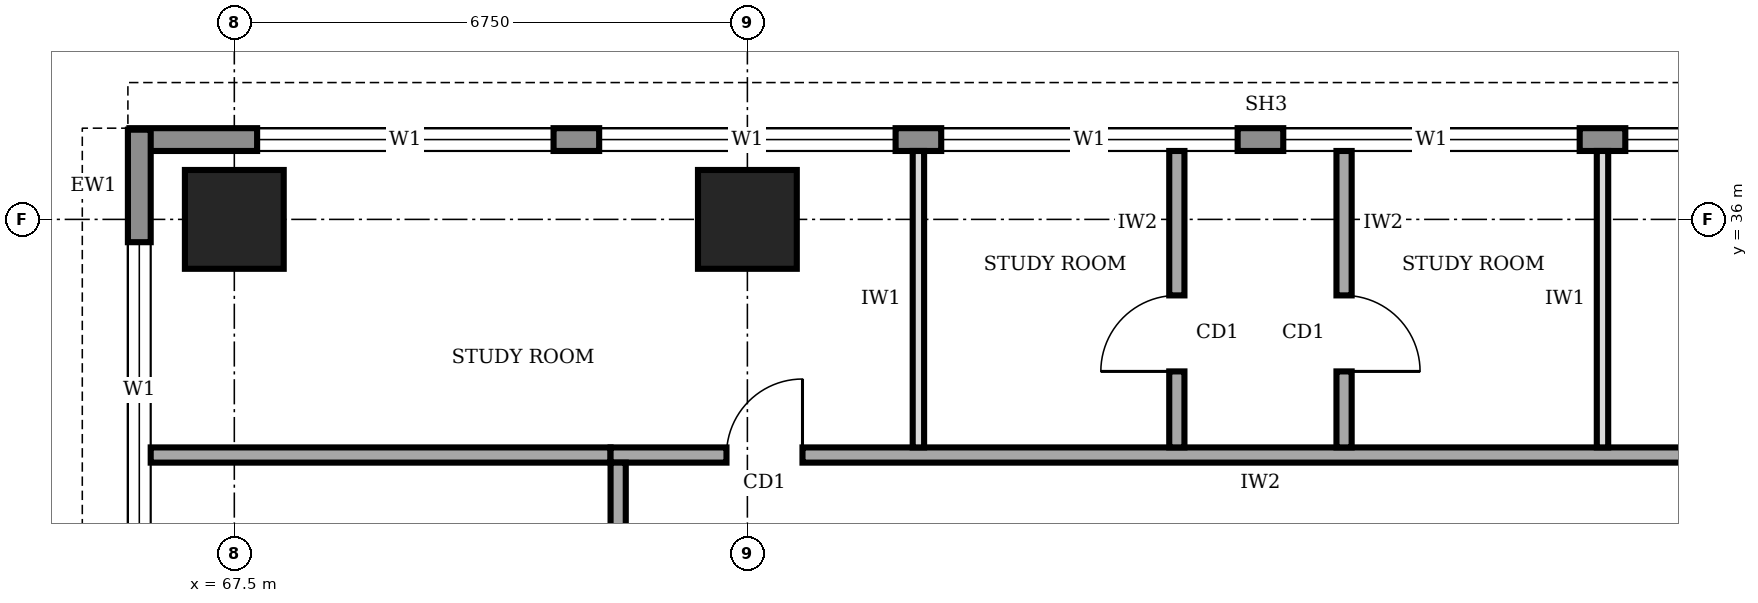
"""IFC4 building model, lengths in metres.
Left out: names, types, materials, properties, quantities, classifications, styles, units other than length and angle.
Written with IfcOpenShell. Run it as: python <this file> out.ifc"""

import sys

from ifc_helpers import new_model, si_unit, direction, frame, frame_2d, origin, origin_2d, place, context, subcontext, project, spatial, rectangle, extrude, element, fill, save


model = new_model("IFC4")
c1 = context("Model", 3, precision=1e-05, world=origin(), true_north=direction((0.0, 1.0)))
c2 = subcontext(c1, "Body", "Model", "MODEL_VIEW")
j1 = project(units=[si_unit("LENGTHUNIT", "METRE"), si_unit("PLANEANGLEUNIT", "RADIAN")], contexts=[c1])
p1 = place(None, origin())
s1 = spatial("IfcSite", under=j1, at=p1, CompositionType="ELEMENT")
p2 = place(p1, origin())
s2 = spatial("IfcBuilding", under=s1, at=p2, CompositionType="ELEMENT")
p3 = place(p2, frame((0.0, 0.0, 217.0)))
s3 = spatial("IfcBuildingStorey", under=s2, at=p3, CompositionType="ELEMENT", Elevation=217.0)
for number, where, z_axis, x_axis in (
    (1, (67.5, 36.0, 0.0), (0.0, 0.0, 1.0), (1.0, 0.0, 0.0)),
    (2, (74.25, 36.0, 0.0), (0.0, 0.0, 1.0), (1.0, 0.0, 0.0)),
):
    element("IfcColumn", number, at=place(p3, frame(where, z_axis=z_axis, x_axis=x_axis)), inside=s3, PredefinedType="COLUMN", context=c2, shape_type="SweptSolid", body=[
        extrude(rectangle(XDim=1.3, YDim=1.3, at=origin_2d()), origin(), (0.0, 0.0, 1.0), 4.0),
    ])
p4 = place(p3, frame((96.03, 37.05, 0.0), z_axis=(0.0, 0.0, 1.0), x_axis=(-1.0, 0.0, 0.0)))
e3 = element("IfcWall", 3, at=p4, inside=s3, PredefinedType="STANDARD", context=c2, shape_type="SweptSolid", body=[
    extrude(rectangle(XDim=29.91, YDim=0.3, at=frame_2d((14.955, 0.0))), origin(), (0.0, 0.0, 1.0), 3.75),
])
p5 = place(p4, frame((24.33, 0.0, 0.9)))
e4 = element("IfcOpeningElement", 4, at=p5, cuts=e3, PredefinedType="OPENING", context=c2, shape_type="SweptSolid", body=[
    extrude(rectangle(XDim=3.9, YDim=2.2, at=frame_2d((1.95, 1.1))), frame((0.0, 0.16, 0.0), z_axis=(0.0, -1.0, 0.0), x_axis=(1.0, 0.0, 0.0)), (0.0, 0.0, 1.0), 0.32),
])
p6 = place(p4, frame((19.83, 0.0, 0.9)))
e5 = element("IfcOpeningElement", 5, at=p6, cuts=e3, PredefinedType="OPENING", context=c2, shape_type="SweptSolid", body=[
    extrude(rectangle(XDim=3.9, YDim=2.2, at=frame_2d((1.95, 1.1))), frame((0.0, 0.16, 0.0), z_axis=(0.0, -1.0, 0.0), x_axis=(1.0, 0.0, 0.0)), (0.0, 0.0, 1.0), 0.32),
])
p7 = place(p4, frame((15.33, 0.0, 0.9)))
e6 = element("IfcOpeningElement", 6, at=p7, cuts=e3, PredefinedType="OPENING", context=c2, shape_type="SweptSolid", body=[
    extrude(rectangle(XDim=3.9, YDim=2.2, at=frame_2d((1.95, 1.1))), frame((0.0, 0.16, 0.0), z_axis=(0.0, -1.0, 0.0), x_axis=(1.0, 0.0, 0.0)), (0.0, 0.0, 1.0), 0.32),
])
p8 = place(p4, frame((10.83, 0.0, 0.9)))
e7 = element("IfcOpeningElement", 7, at=p8, cuts=e3, PredefinedType="OPENING", context=c2, shape_type="SweptSolid", body=[
    extrude(rectangle(XDim=3.9, YDim=2.2, at=frame_2d((1.95, 1.1))), frame((0.0, 0.16, 0.0), z_axis=(0.0, -1.0, 0.0), x_axis=(1.0, 0.0, 0.0)), (0.0, 0.0, 1.0), 0.32),
])
p9 = place(p4, frame((6.33, 0.0, 0.9)))
e8 = element("IfcOpeningElement", 8, at=p9, cuts=e3, PredefinedType="OPENING", context=c2, shape_type="SweptSolid", body=[
    extrude(rectangle(XDim=3.9, YDim=2.2, at=frame_2d((1.95, 1.1))), frame((0.0, 0.16, 0.0), z_axis=(0.0, -1.0, 0.0), x_axis=(1.0, 0.0, 0.0)), (0.0, 0.0, 1.0), 0.32),
])
p10 = place(p4, frame((1.83, 0.0, 0.9)))
e9 = element("IfcOpeningElement", 9, at=p10, cuts=e3, PredefinedType="OPENING", context=c2, shape_type="SweptSolid", body=[
    extrude(rectangle(XDim=3.9, YDim=2.2, at=frame_2d((1.95, 1.1))), frame((0.0, 0.16, 0.0), z_axis=(0.0, -1.0, 0.0), x_axis=(1.0, 0.0, 0.0)), (0.0, 0.0, 1.0), 0.32),
])
p11 = place(p3, frame((66.25, 37.18, 0.0), z_axis=(0.0, 0.0, 1.0), x_axis=(0.0, -1.0, 0.0)))
e10 = element("IfcWall", 10, at=p11, inside=s3, PredefinedType="STANDARD", context=c2, shape_type="SweptSolid", body=[
    extrude(rectangle(XDim=33.86, YDim=0.3, at=frame_2d((16.93, 0.0))), origin(), (0.0, 0.0, 1.0), 3.75),
])
p12 = place(p11, frame((28.48, 0.0, 0.9)))
e11 = element("IfcOpeningElement", 11, at=p12, cuts=e10, PredefinedType="OPENING", context=c2, shape_type="SweptSolid", body=[
    extrude(rectangle(XDim=3.9, YDim=2.2, at=frame_2d((1.95, 1.1))), frame((0.0, 0.16, 0.0), z_axis=(0.0, -1.0, 0.0), x_axis=(1.0, 0.0, 0.0)), (0.0, 0.0, 1.0), 0.32),
])
p13 = place(p11, frame((23.98, 0.0, 0.9)))
e12 = element("IfcOpeningElement", 12, at=p13, cuts=e10, PredefinedType="OPENING", context=c2, shape_type="SweptSolid", body=[
    extrude(rectangle(XDim=3.9, YDim=2.2, at=frame_2d((1.95, 1.1))), frame((0.0, 0.16, 0.0), z_axis=(0.0, -1.0, 0.0), x_axis=(1.0, 0.0, 0.0)), (0.0, 0.0, 1.0), 0.32),
])
p14 = place(p11, frame((19.48, 0.0, 0.9)))
e13 = element("IfcOpeningElement", 13, at=p14, cuts=e10, PredefinedType="OPENING", context=c2, shape_type="SweptSolid", body=[
    extrude(rectangle(XDim=3.9, YDim=2.2, at=frame_2d((1.95, 1.1))), frame((0.0, 0.16, 0.0), z_axis=(0.0, -1.0, 0.0), x_axis=(1.0, 0.0, 0.0)), (0.0, 0.0, 1.0), 0.32),
])
p15 = place(p11, frame((14.98, 0.0, 0.9)))
e14 = element("IfcOpeningElement", 14, at=p15, cuts=e10, PredefinedType="OPENING", context=c2, shape_type="SweptSolid", body=[
    extrude(rectangle(XDim=3.9, YDim=2.2, at=frame_2d((1.95, 1.1))), frame((0.0, 0.16, 0.0), z_axis=(0.0, -1.0, 0.0), x_axis=(1.0, 0.0, 0.0)), (0.0, 0.0, 1.0), 0.32),
])
p16 = place(p11, frame((10.48, 0.0, 0.9)))
e15 = element("IfcOpeningElement", 15, at=p16, cuts=e10, PredefinedType="OPENING", context=c2, shape_type="SweptSolid", body=[
    extrude(rectangle(XDim=3.9, YDim=2.2, at=frame_2d((1.95, 1.1))), frame((0.0, 0.16, 0.0), z_axis=(0.0, -1.0, 0.0), x_axis=(1.0, 0.0, 0.0)), (0.0, 0.0, 1.0), 0.32),
])
p17 = place(p11, frame((5.98, 0.0, 0.9)))
e16 = element("IfcOpeningElement", 16, at=p17, cuts=e10, PredefinedType="OPENING", context=c2, shape_type="SweptSolid", body=[
    extrude(rectangle(XDim=3.9, YDim=2.2, at=frame_2d((1.95, 1.1))), frame((0.0, 0.16, 0.0), z_axis=(0.0, -1.0, 0.0), x_axis=(1.0, 0.0, 0.0)), (0.0, 0.0, 1.0), 0.32),
])
p18 = place(p11, frame((1.48, 0.0, 0.9)))
e17 = element("IfcOpeningElement", 17, at=p18, cuts=e10, PredefinedType="OPENING", context=c2, shape_type="SweptSolid", body=[
    extrude(rectangle(XDim=3.9, YDim=2.2, at=frame_2d((1.95, 1.1))), frame((0.0, 0.16, 0.0), z_axis=(0.0, -1.0, 0.0), x_axis=(1.0, 0.0, 0.0)), (0.0, 0.0, 1.0), 0.32),
])
p19 = place(p3, frame((89.35, 32.9, 0.0), z_axis=(0.0, 0.0, 1.0), x_axis=(-1.0, 0.0, 0.0)))
e18 = element("IfcWall", 18, at=p19, inside=s3, PredefinedType="SOLIDWALL", context=c2, shape_type="SweptSolid", body=[
    extrude(rectangle(XDim=16.9, YDim=0.2, at=frame_2d((8.45, 0.0))), origin(), (0.0, 0.0, 1.0), 3.75),
])
p20 = place(p19, frame((14.375, 0.0, 0.0)))
e19 = element("IfcOpeningElement", 19, at=p20, cuts=e18, PredefinedType="OPENING", context=c2, shape_type="SweptSolid", body=[
    extrude(rectangle(XDim=1.0, YDim=2.1, at=frame_2d((0.5, 1.05))), frame((0.0, 0.11, 0.0), z_axis=(0.0, -1.0, 0.0), x_axis=(1.0, 0.0, 0.0)), (0.0, 0.0, 1.0), 0.22),
])
p21 = place(p19, frame((1.325, 0.0, 0.0)))
e20 = element("IfcOpeningElement", 20, at=p21, cuts=e18, PredefinedType="OPENING", context=c2, shape_type="SweptSolid", body=[
    extrude(rectangle(XDim=1.0, YDim=2.1, at=frame_2d((0.5, 1.05))), frame((0.0, 0.11, 0.0), z_axis=(0.0, -1.0, 0.0), x_axis=(1.0, 0.0, 0.0)), (0.0, 0.0, 1.0), 0.22),
])
p22 = place(p3, frame((72.55, 32.8, 0.0), z_axis=(0.0, 0.0, 1.0), x_axis=(0.0, -1.0, 0.0)))
e21 = element("IfcWall", 21, at=p22, inside=s3, PredefinedType="SOLIDWALL", context=c2, shape_type="SweptSolid", body=[
    extrude(rectangle(XDim=23.8, YDim=0.2, at=frame_2d((11.9, 0.0))), origin(), (0.0, 0.0, 1.0), 3.75),
])
p23 = place(p22, frame((21.05, 0.0, 0.0)))
e22 = element("IfcOpeningElement", 22, at=p23, cuts=e21, PredefinedType="OPENING", context=c2, shape_type="SweptSolid", body=[
    extrude(rectangle(XDim=1.0, YDim=2.1, at=frame_2d((0.5, 1.05))), frame((0.0, 0.11, 0.0), z_axis=(0.0, -1.0, 0.0), x_axis=(1.0, 0.0, 0.0)), (0.0, 0.0, 1.0), 0.22),
])
p24 = place(p22, frame((14.3, 0.0, 0.0)))
e23 = element("IfcOpeningElement", 23, at=p24, cuts=e21, PredefinedType="OPENING", context=c2, shape_type="SweptSolid", body=[
    extrude(rectangle(XDim=1.0, YDim=2.1, at=frame_2d((0.5, 1.05))), frame((0.0, 0.11, 0.0), z_axis=(0.0, -1.0, 0.0), x_axis=(1.0, 0.0, 0.0)), (0.0, 0.0, 1.0), 0.22),
])
p25 = place(p22, frame((7.55, 0.0, 0.0)))
e24 = element("IfcOpeningElement", 24, at=p25, cuts=e21, PredefinedType="OPENING", context=c2, shape_type="SweptSolid", body=[
    extrude(rectangle(XDim=1.0, YDim=2.1, at=frame_2d((0.5, 1.05))), frame((0.0, 0.11, 0.0), z_axis=(0.0, -1.0, 0.0), x_axis=(1.0, 0.0, 0.0)), (0.0, 0.0, 1.0), 0.22),
])
p26 = place(p22, frame((2.3, 0.0, 0.0)))
e25 = element("IfcOpeningElement", 25, at=p26, cuts=e21, PredefinedType="OPENING", context=c2, shape_type="SweptSolid", body=[
    extrude(rectangle(XDim=1.0, YDim=2.1, at=frame_2d((0.5, 1.05))), frame((0.0, 0.11, 0.0), z_axis=(0.0, -1.0, 0.0), x_axis=(1.0, 0.0, 0.0)), (0.0, 0.0, 1.0), 0.22),
])
p27 = place(p3, frame((79.9, 33.0, 0.0), z_axis=(0.0, 0.0, 1.0), x_axis=(0.0, 1.0, 0.0)))
e26 = element("IfcWall", 26, at=p27, inside=s3, PredefinedType="SOLIDWALL", context=c2, shape_type="SweptSolid", body=[
    extrude(rectangle(XDim=3.9, YDim=0.2, at=frame_2d((1.95, 0.0))), origin(), (0.0, 0.0, 1.0), 3.75),
])
p28 = place(p27, frame((1.0, 0.0, 0.0)))
e27 = element("IfcOpeningElement", 27, at=p28, cuts=e26, PredefinedType="OPENING", context=c2, shape_type="SweptSolid", body=[
    extrude(rectangle(XDim=1.0, YDim=2.1, at=frame_2d((0.5, 1.05))), frame((0.0, 0.11, 0.0), z_axis=(0.0, -1.0, 0.0), x_axis=(1.0, 0.0, 0.0)), (0.0, 0.0, 1.0), 0.22),
])
p29 = place(p3, frame((82.1, 36.9, 0.0), z_axis=(0.0, 0.0, 1.0), x_axis=(0.0, -1.0, 0.0)))
e28 = element("IfcWall", 28, at=p29, inside=s3, PredefinedType="SOLIDWALL", context=c2, shape_type="SweptSolid", body=[
    extrude(rectangle(XDim=3.9, YDim=0.2, at=frame_2d((1.95, 0.0))), origin(), (0.0, 0.0, 1.0), 3.75),
])
p30 = place(p29, frame((1.9, 0.0, 0.0)))
e29 = element("IfcOpeningElement", 29, at=p30, cuts=e28, PredefinedType="OPENING", context=c2, shape_type="SweptSolid", body=[
    extrude(rectangle(XDim=1.0, YDim=2.1, at=frame_2d((0.5, 1.05))), frame((0.0, 0.11, 0.0), z_axis=(0.0, -1.0, 0.0), x_axis=(1.0, 0.0, 0.0)), (0.0, 0.0, 1.0), 0.22),
])
p31 = place(p3, frame((66.4, 32.9, 0.0), z_axis=(0.0, 0.0, 1.0), x_axis=(1.0, 0.0, 0.0)))
e30 = element("IfcWall", 30, at=p31, inside=s3, PredefinedType="SOLIDWALL", context=c2, shape_type="SweptSolid", body=[
    extrude(rectangle(XDim=6.05, YDim=0.2, at=frame_2d((3.025, 0.0))), origin(), (0.0, 0.0, 1.0), 3.75),
])
for number, where, z_axis, x_axis in (
    (31, (76.5, 33.0, 0.0), (0.0, 0.0, 1.0), (0.0, 1.0, 0.0)),
    (32, (85.5, 33.0, 0.0), (0.0, 0.0, 1.0), (0.0, 1.0, 0.0)),
):
    element("IfcWall", number, at=place(p3, frame(where, z_axis=z_axis, x_axis=x_axis)), inside=s3, PredefinedType="PARTITIONING", context=c2, shape_type="SweptSolid", body=[
        extrude(rectangle(XDim=3.9, YDim=0.15, at=frame_2d((1.95, 0.0))), origin(), (0.0, 0.0, 1.0), 3.75),
    ])
p32 = place(p5, origin())
e33 = element("IfcWindow", 33, at=p32, inside=s3, PartitioningType="SINGLE_PANEL", PredefinedType="WINDOW", context=c2, shape_type="SweptSolid", body=[
    extrude(rectangle(XDim=3.9, YDim=2.2, at=frame_2d((1.95, 1.1))), frame((0.0, 0.03, 0.0), z_axis=(0.0, -1.0, 0.0), x_axis=(1.0, 0.0, 0.0)), (0.0, 0.0, 1.0), 0.06),
])
fill(e4, e33)
p33 = place(p6, origin())
e34 = element("IfcWindow", 34, at=p33, inside=s3, PartitioningType="SINGLE_PANEL", PredefinedType="WINDOW", context=c2, shape_type="SweptSolid", body=[
    extrude(rectangle(XDim=3.9, YDim=2.2, at=frame_2d((1.95, 1.1))), frame((0.0, 0.03, 0.0), z_axis=(0.0, -1.0, 0.0), x_axis=(1.0, 0.0, 0.0)), (0.0, 0.0, 1.0), 0.06),
])
fill(e5, e34)
p34 = place(p7, origin())
e35 = element("IfcWindow", 35, at=p34, inside=s3, PartitioningType="SINGLE_PANEL", PredefinedType="WINDOW", context=c2, shape_type="SweptSolid", body=[
    extrude(rectangle(XDim=3.9, YDim=2.2, at=frame_2d((1.95, 1.1))), frame((0.0, 0.03, 0.0), z_axis=(0.0, -1.0, 0.0), x_axis=(1.0, 0.0, 0.0)), (0.0, 0.0, 1.0), 0.06),
])
fill(e6, e35)
p35 = place(p8, origin())
e36 = element("IfcWindow", 36, at=p35, inside=s3, PartitioningType="SINGLE_PANEL", PredefinedType="WINDOW", context=c2, shape_type="SweptSolid", body=[
    extrude(rectangle(XDim=3.9, YDim=2.2, at=frame_2d((1.95, 1.1))), frame((0.0, 0.03, 0.0), z_axis=(0.0, -1.0, 0.0), x_axis=(1.0, 0.0, 0.0)), (0.0, 0.0, 1.0), 0.06),
])
fill(e7, e36)
p36 = place(p9, origin())
e37 = element("IfcWindow", 37, at=p36, inside=s3, PartitioningType="SINGLE_PANEL", PredefinedType="WINDOW", context=c2, shape_type="SweptSolid", body=[
    extrude(rectangle(XDim=3.9, YDim=2.2, at=frame_2d((1.95, 1.1))), frame((0.0, 0.03, 0.0), z_axis=(0.0, -1.0, 0.0), x_axis=(1.0, 0.0, 0.0)), (0.0, 0.0, 1.0), 0.06),
])
fill(e8, e37)
p37 = place(p18, origin())
e38 = element("IfcWindow", 38, at=p37, inside=s3, PartitioningType="SINGLE_PANEL", PredefinedType="WINDOW", context=c2, shape_type="SweptSolid", body=[
    extrude(rectangle(XDim=3.9, YDim=2.2, at=frame_2d((1.95, 1.1))), frame((0.0, 0.03, 0.0), z_axis=(0.0, -1.0, 0.0), x_axis=(1.0, 0.0, 0.0)), (0.0, 0.0, 1.0), 0.06),
])
fill(e17, e38)
p38 = place(p20, frame((1.0, 0.0, 0.0), z_axis=(0.0, 0.0, 1.0), x_axis=(-1.0, 0.0, 0.0)))
e39 = element("IfcDoor", 39, at=p38, inside=s3, OperationType="SINGLE_SWING_RIGHT", PredefinedType="DOOR", context=c2, shape_type="SweptSolid", body=[
    extrude(rectangle(XDim=1.0, YDim=2.1, at=frame_2d((0.5, 1.05))), frame((0.0, 0.025, 0.0), z_axis=(0.0, -1.0, 0.0), x_axis=(1.0, 0.0, 0.0)), (0.0, 0.0, 1.0), 0.05),
])
fill(e19, e39)
p39 = place(p28, origin())
e40 = element("IfcDoor", 40, at=p39, inside=s3, OperationType="SINGLE_SWING_LEFT", PredefinedType="DOOR", context=c2, shape_type="SweptSolid", body=[
    extrude(rectangle(XDim=1.0, YDim=2.1, at=frame_2d((0.5, 1.05))), frame((0.0, 0.025, 0.0), z_axis=(0.0, -1.0, 0.0), x_axis=(1.0, 0.0, 0.0)), (0.0, 0.0, 1.0), 0.05),
])
fill(e27, e40)
p40 = place(p30, origin())
e41 = element("IfcDoor", 41, at=p40, inside=s3, OperationType="SINGLE_SWING_RIGHT", PredefinedType="DOOR", context=c2, shape_type="SweptSolid", body=[
    extrude(rectangle(XDim=1.0, YDim=2.1, at=frame_2d((0.5, 1.05))), frame((0.0, 0.025, 0.0), z_axis=(0.0, -1.0, 0.0), x_axis=(1.0, 0.0, 0.0)), (0.0, 0.0, 1.0), 0.05),
])
fill(e29, e41)
save(model, sys.argv[1])
